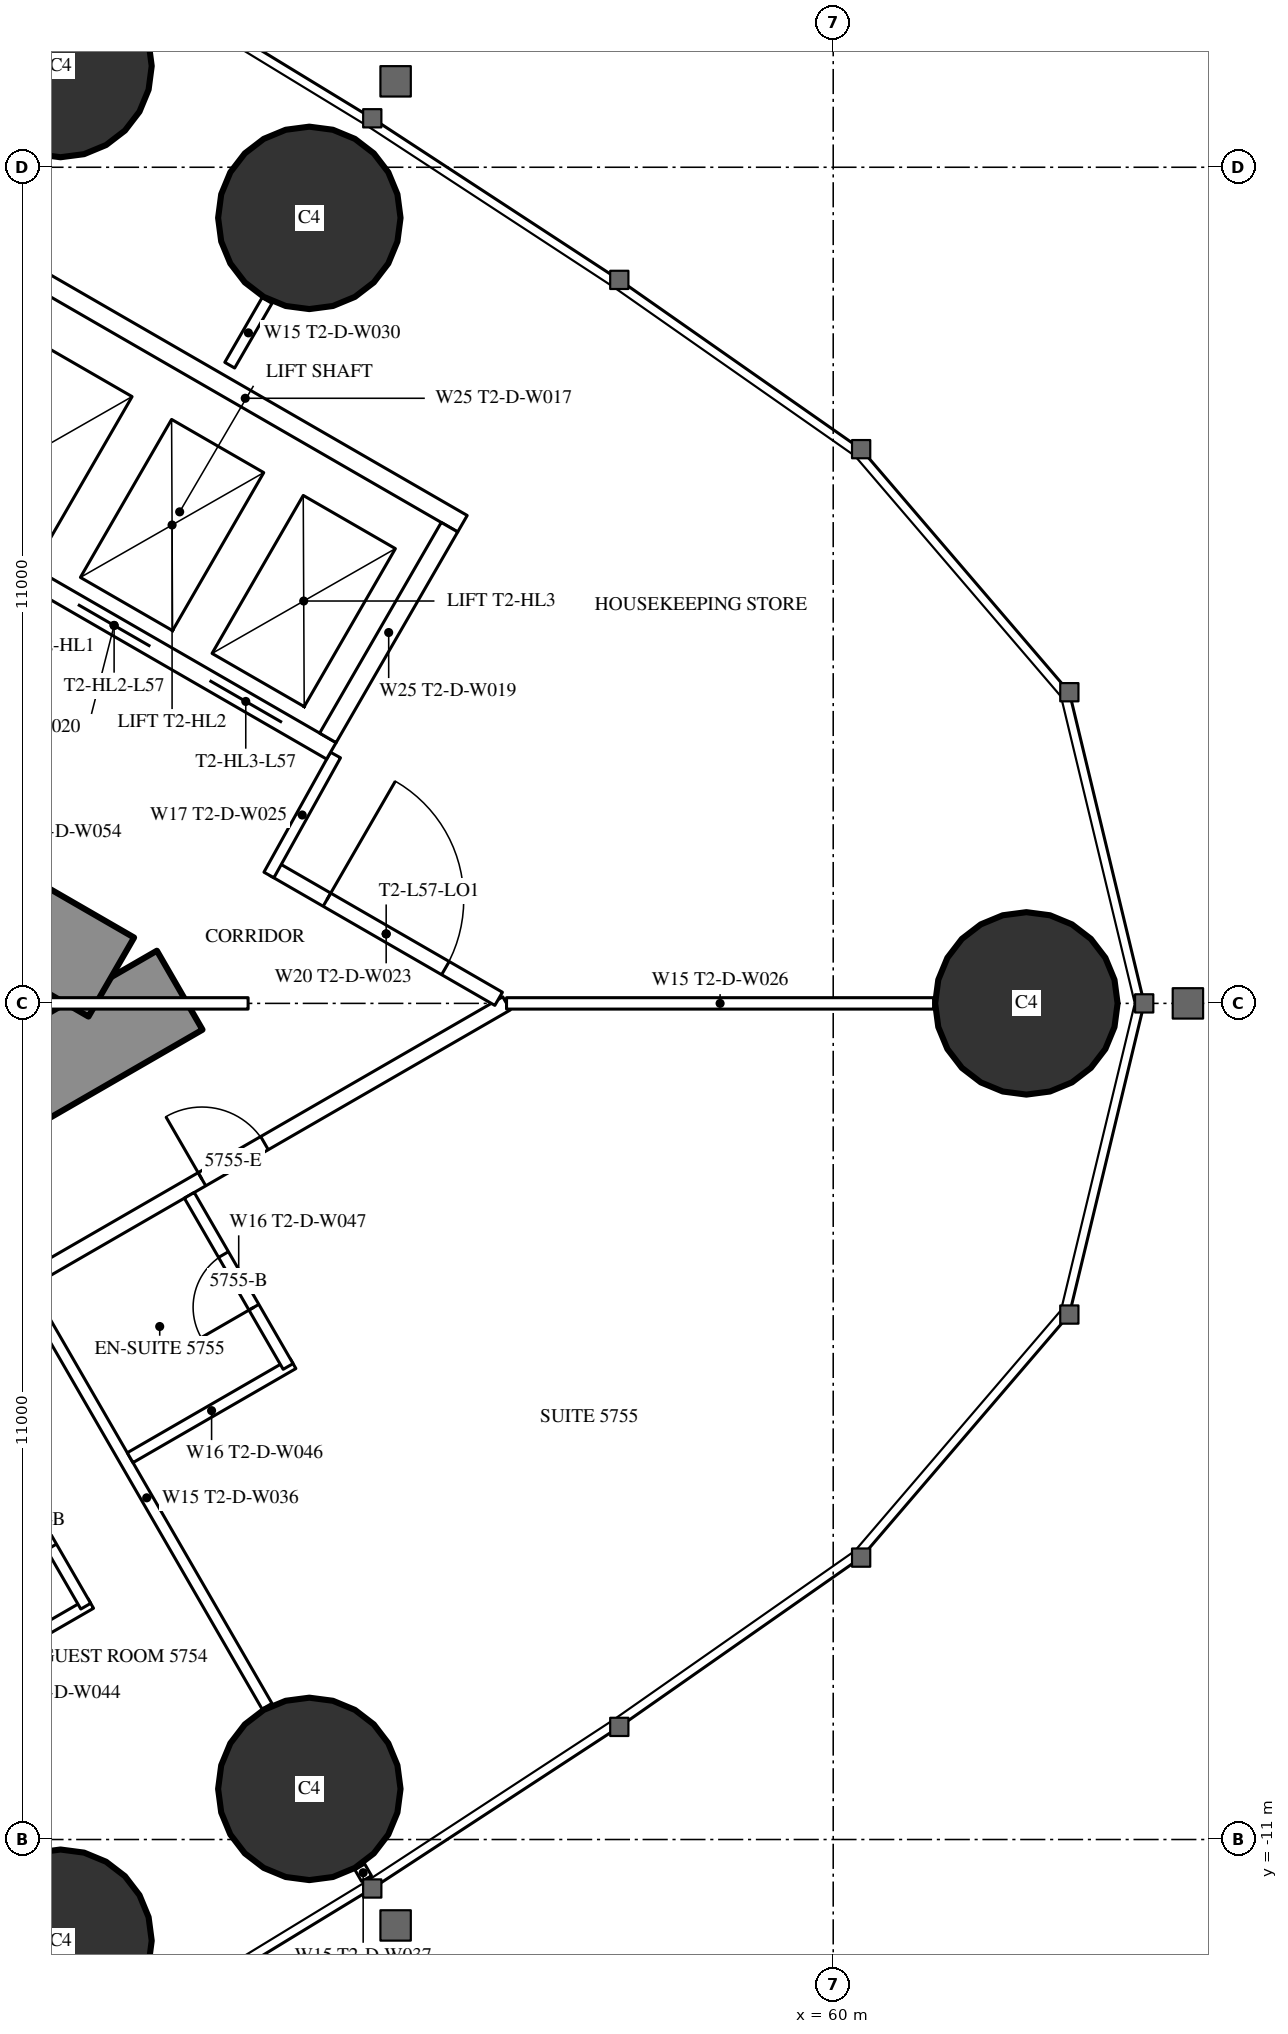
"""IFC4 building model, lengths in metres.
Left out: names, types, materials, properties, quantities, classifications, styles, units other than length and angle.
Written with IfcOpenShell. Run it as: python <this file> out.ifc"""

import sys

from ifc_helpers import new_model, si_unit, direction, frame, frame_2d, origin, origin_2d, place, context, subcontext, project, spatial, rectangle, circle, extrude, element, fill, save


model = new_model("IFC4")
c1 = context("Model", 3, precision=1e-05, world=origin(), true_north=direction((0.0, 1.0)))
c2 = subcontext(c1, "Body", "Model", "MODEL_VIEW")
j1 = project(units=[si_unit("LENGTHUNIT", "METRE"), si_unit("PLANEANGLEUNIT", "RADIAN")], contexts=[c1])
p1 = place(None, origin())
s1 = spatial("IfcSite", under=j1, at=p1, CompositionType="ELEMENT")
p2 = place(p1, origin())
s2 = spatial("IfcBuilding", under=s1, at=p2, CompositionType="ELEMENT")
p3 = place(p2, frame((0.0, 0.0, 215.3)))
s3 = spatial("IfcBuildingStorey", under=s2, at=p3, CompositionType="ELEMENT", Elevation=215.3)
for number, where, z_axis, x_axis in (
    (1, (62.542, 0.0, 0.0), (0.0, 0.0, 1.0), (1.0, 0.0, 0.0)),
    (2, (53.108, 10.334, 0.0), (0.0, 0.0, 1.0), (1.0, 0.0, 0.0)),
    (3, (49.834, 12.332, 0.0), (0.0, 0.0, 1.0), (1.0, 0.0, 0.0)),
    (4, (49.834, -12.332, 0.0), (0.0, 0.0, 1.0), (1.0, 0.0, 0.0)),
    (5, (53.108, -10.334, 0.0), (0.0, 0.0, 1.0), (1.0, 0.0, 0.0)),
):
    element("IfcColumn", number, at=place(p3, frame(where, z_axis=z_axis, x_axis=x_axis)), inside=s3, PredefinedType="COLUMN", context=c2, shape_type="SweptSolid", body=[
        extrude(circle(Radius=1.2, at=origin_2d()), origin(), (0.0, 0.0, 1.0), 3.6),
    ])
p4 = place(p3, frame((27.2, -13.8, 0.0), z_axis=(0.0, 0.0, 1.0), x_axis=(0.866027159892, 0.499996958321, 0.0)))
e6 = element("IfcWall", 6, at=p4, inside=s3, PredefinedType="SHEAR", context=c2, shape_type="SweptSolid", body=[
    extrude(rectangle(XDim=27.947, YDim=1.2, at=frame_2d((13.973, 0.0))), origin(), (0.0, 0.0, 1.0), 3.6),
])
p5 = place(p4, frame((4.6, 0.0, 0.0)))
e7 = element("IfcOpeningElement", 7, at=p5, cuts=e6, PredefinedType="OPENING", context=c2, shape_type="SweptSolid", body=[
    extrude(rectangle(XDim=1.0, YDim=2.2, at=frame_2d((0.5, 1.1))), frame((0.0, 0.61, 0.0), z_axis=(0.0, -1.0, 0.0), x_axis=(1.0, 0.0, 0.0)), (0.0, 0.0, 1.0), 1.22),
])
p6 = place(p4, frame((13.395, 0.0, 0.0)))
e8 = element("IfcOpeningElement", 8, at=p6, cuts=e6, PredefinedType="OPENING", context=c2, shape_type="SweptSolid", body=[
    extrude(rectangle(XDim=1.8, YDim=2.2, at=frame_2d((0.9, 1.1))), frame((0.0, 0.61, 0.0), z_axis=(0.0, -1.0, 0.0), x_axis=(1.0, 0.0, 0.0)), (0.0, 0.0, 1.0), 1.22),
])
p7 = place(p3, frame((27.2, 13.8, 0.0), z_axis=(0.0, 0.0, 1.0), x_axis=(0.866024515034, -0.500001539357, 0.0)))
e9 = element("IfcWall", 9, at=p7, inside=s3, PredefinedType="SHEAR", context=c2, shape_type="SweptSolid", body=[
    extrude(rectangle(XDim=26.907, YDim=1.2, at=frame_2d((13.454, 0.0))), origin(), (0.0, 0.0, 1.0), 3.6),
])
p8 = place(p7, frame((4.6, 0.0, 0.0)))
e10 = element("IfcOpeningElement", 10, at=p8, cuts=e9, PredefinedType="OPENING", context=c2, shape_type="SweptSolid", body=[
    extrude(rectangle(XDim=1.0, YDim=2.2, at=frame_2d((0.5, 1.1))), frame((0.0, 0.61, 0.0), z_axis=(0.0, -1.0, 0.0), x_axis=(1.0, 0.0, 0.0)), (0.0, 0.0, 1.0), 1.22),
])
p9 = place(p7, frame((13.395, 0.0, 0.0)))
e11 = element("IfcOpeningElement", 11, at=p9, cuts=e9, PredefinedType="OPENING", context=c2, shape_type="SweptSolid", body=[
    extrude(rectangle(XDim=1.8, YDim=2.2, at=frame_2d((0.9, 1.1))), frame((0.0, 0.61, 0.0), z_axis=(0.0, -1.0, 0.0), x_axis=(1.0, 0.0, 0.0)), (0.0, 0.0, 1.0), 1.22),
])
p10 = place(p3, frame((28.959, -15.44, 0.0), z_axis=(0.0, 0.0, 1.0), x_axis=(0.866025227435, 0.500000305447, 0.0)))
e12 = element("IfcWall", 12, at=p10, inside=s3, PredefinedType="PARTITIONING", context=c2, shape_type="SweptSolid", body=[
    extrude(rectangle(XDim=30.88, YDim=0.2, at=frame_2d((15.44, 0.0))), origin(), (0.0, 0.0, 1.0), 3.35),
])
p11 = place(p10, frame((0.494, 0.0, 0.0)))
e13 = element("IfcOpeningElement", 13, at=p11, cuts=e12, PredefinedType="OPENING", context=c2, shape_type="SweptSolid", body=[
    extrude(rectangle(XDim=1.8, YDim=2.2, at=frame_2d((0.9, 1.1))), frame((0.0, 0.11, 0.0), z_axis=(0.0, -1.0, 0.0), x_axis=(1.0, 0.0, 0.0)), (0.0, 0.0, 1.0), 0.22),
])
p12 = place(p10, frame((7.687, 0.0, 0.0)))
e14 = element("IfcOpeningElement", 14, at=p12, cuts=e12, PredefinedType="OPENING", context=c2, shape_type="SweptSolid", body=[
    extrude(rectangle(XDim=1.0, YDim=2.2, at=frame_2d((0.5, 1.1))), frame((0.0, 0.11, 0.0), z_axis=(0.0, -1.0, 0.0), x_axis=(1.0, 0.0, 0.0)), (0.0, 0.0, 1.0), 0.22),
])
p13 = place(p10, frame((16.137, 0.0, 0.0)))
e15 = element("IfcOpeningElement", 15, at=p13, cuts=e12, PredefinedType="OPENING", context=c2, shape_type="SweptSolid", body=[
    extrude(rectangle(XDim=0.95, YDim=2.2, at=frame_2d((0.475, 1.1))), frame((0.0, 0.11, 0.0), z_axis=(0.0, -1.0, 0.0), x_axis=(1.0, 0.0, 0.0)), (0.0, 0.0, 1.0), 0.22),
])
p14 = place(p10, frame((20.021, 0.0, 0.0)))
e16 = element("IfcOpeningElement", 16, at=p14, cuts=e12, PredefinedType="OPENING", context=c2, shape_type="SweptSolid", body=[
    extrude(rectangle(XDim=0.95, YDim=2.2, at=frame_2d((0.475, 1.1))), frame((0.0, 0.11, 0.0), z_axis=(0.0, -1.0, 0.0), x_axis=(1.0, 0.0, 0.0)), (0.0, 0.0, 1.0), 0.22),
])
p15 = place(p10, frame((26.253, 0.0, 0.0)))
e17 = element("IfcOpeningElement", 17, at=p15, cuts=e12, PredefinedType="OPENING", context=c2, shape_type="SweptSolid", body=[
    extrude(rectangle(XDim=0.95, YDim=2.2, at=frame_2d((0.475, 1.1))), frame((0.0, 0.11, 0.0), z_axis=(0.0, -1.0, 0.0), x_axis=(1.0, 0.0, 0.0)), (0.0, 0.0, 1.0), 0.22),
])
p16 = place(p3, frame((49.385, -3.763, 0.0), z_axis=(0.0, 0.0, 1.0), x_axis=(0.499999447814, -0.866025722589, 0.0)))
e18 = element("IfcWall", 18, at=p16, inside=s3, PredefinedType="PARTITIONING", context=c2, shape_type="SweptSolid", body=[
    extrude(rectangle(XDim=6.333, YDim=0.15, at=frame_2d((3.166, 0.0))), origin(), (0.0, 0.0, 1.0), 2.45),
])
p17 = place(p3, frame((53.771, -11.36, 0.0), z_axis=(0.0, 0.0, 1.0), x_axis=(0.499524978789, -0.866299483762, 0.0)))
e19 = element("IfcWall", 19, at=p17, inside=s3, PredefinedType="PARTITIONING", context=c2, shape_type="SweptSolid", body=[
    extrude(rectangle(XDim=0.178, YDim=0.15, at=frame_2d((0.089, 0.0))), origin(), (0.0, 0.0, 1.0), 2.45),
])
p18 = place(p3, frame((55.702, 0.0, 0.0), z_axis=(0.0, 0.0, 1.0), x_axis=(1.0, 0.0, 0.0)))
e20 = element("IfcWall", 20, at=p18, inside=s3, PredefinedType="PARTITIONING", context=c2, shape_type="SweptSolid", body=[
    extrude(rectangle(XDim=5.619, YDim=0.15, at=frame_2d((2.81, 0.0))), origin(), (0.0, 0.0, 1.0), 2.45),
])
p19 = place(p3, frame((52.06, 8.396, 0.0), z_axis=(0.0, 0.0, 1.0), x_axis=(0.500095379624, 0.865970329329, 0.0)))
e21 = element("IfcWall", 21, at=p19, inside=s3, PredefinedType="PARTITIONING", context=c2, shape_type="SweptSolid", body=[
    extrude(rectangle(XDim=0.982, YDim=0.15, at=frame_2d((0.491, 0.0))), origin(), (0.0, 0.0, 1.0), 3.35),
])
p20 = place(p3, frame((52.639, 1.769, 0.0), z_axis=(0.0, 0.0, 1.0), x_axis=(0.866027340901, -0.4999966448, 0.0)))
e22 = element("IfcWall", 22, at=p20, inside=s3, PredefinedType="PARTITIONING", context=c2, shape_type="SweptSolid", body=[
    extrude(rectangle(XDim=3.417, YDim=0.2, at=frame_2d((1.708, 0.0))), origin(), (0.0, 0.0, 1.0), 3.35),
])
p21 = place(p20, frame((0.809, 0.0, 0.0)))
e23 = element("IfcOpeningElement", 23, at=p21, cuts=e22, PredefinedType="OPENING", context=c2, shape_type="SweptSolid", body=[
    extrude(rectangle(XDim=1.8, YDim=2.2, at=frame_2d((0.9, 1.1))), frame((0.0, 0.11, 0.0), z_axis=(0.0, -1.0, 0.0), x_axis=(1.0, 0.0, 0.0)), (0.0, 0.0, 1.0), 0.22),
])
p22 = place(p3, frame((52.576, 1.689, 0.0), z_axis=(0.0, 0.0, 1.0), x_axis=(0.485424724123, 0.874278466629, 0.0)))
e24 = element("IfcWall", 24, at=p22, inside=s3, PredefinedType="PARTITIONING", context=c2, shape_type="SweptSolid", body=[
    extrude(rectangle(XDim=1.805, YDim=0.15, at=frame_2d((0.903, 0.0))), origin(), (0.0, 0.0, 1.0), 3.35),
])
p23 = place(p3, frame((48.088, -9.13, 0.0), z_axis=(0.0, 0.0, 1.0), x_axis=(0.86604923931, 0.499958713387, 0.0)))
e25 = element("IfcWall", 25, at=p23, inside=s3, PredefinedType="PARTITIONING", context=c2, shape_type="SweptSolid", body=[
    extrude(rectangle(XDim=2.475, YDim=0.15, at=frame_2d((1.237, 0.0))), origin(), (0.0, 0.0, 1.0), 3.35),
])
p24 = place(p3, frame((48.866, -5.679, 0.0), z_axis=(0.0, 0.0, 1.0), x_axis=(0.500006934395, -0.866021400173, 0.0)))
e26 = element("IfcWall", 26, at=p24, inside=s3, PredefinedType="PARTITIONING", context=c2, shape_type="SweptSolid", body=[
    extrude(rectangle(XDim=2.6, YDim=0.15, at=frame_2d((1.3, 0.0))), origin(), (0.0, 0.0, 1.0), 3.35),
])
p25 = place(p24, frame((0.9, 0.0, 0.0)))
e27 = element("IfcOpeningElement", 27, at=p25, cuts=e26, PredefinedType="OPENING", context=c2, shape_type="SweptSolid", body=[
    extrude(rectangle(XDim=0.8, YDim=2.2, at=frame_2d((0.4, 1.1))), frame((0.0, 0.085, 0.0), z_axis=(0.0, -1.0, 0.0), x_axis=(1.0, 0.0, 0.0)), (0.0, 0.0, 1.0), 0.17),
])
p26 = place(p3, frame((50.75, -5.977, 0.0), z_axis=(0.0, 0.0, 1.0), x_axis=(0.866031185235, 0.4999899861, 0.0)))
e28 = element("IfcWall", 28, at=p26, inside=s3, PredefinedType="PARTITIONING", context=c2, shape_type="SweptSolid", body=[
    extrude(rectangle(XDim=2.475, YDim=0.15, at=frame_2d((1.238, 0.0))), origin(), (0.0, 0.0, 1.0), 3.35),
])
p27 = place(p3, frame((51.529, -2.525, 0.0), z_axis=(0.0, 0.0, 1.0), x_axis=(0.500006934395, -0.866021400173, 0.0)))
e29 = element("IfcWall", 29, at=p27, inside=s3, PredefinedType="PARTITIONING", context=c2, shape_type="SweptSolid", body=[
    extrude(rectangle(XDim=2.6, YDim=0.15, at=frame_2d((1.3, 0.0))), origin(), (0.0, 0.0, 1.0), 3.35),
])
p28 = place(p27, frame((0.9, 0.0, 0.0)))
e30 = element("IfcOpeningElement", 30, at=p28, cuts=e29, PredefinedType="OPENING", context=c2, shape_type="SweptSolid", body=[
    extrude(rectangle(XDim=0.8, YDim=2.2, at=frame_2d((0.4, 1.1))), frame((0.0, 0.085, 0.0), z_axis=(0.0, -1.0, 0.0), x_axis=(1.0, 0.0, 0.0)), (0.0, 0.0, 1.0), 0.17),
])
p29 = place(p3, frame((44.575, 0.0, 0.0), z_axis=(0.0, 0.0, 1.0), x_axis=(1.0, 0.0, 0.0)))
e31 = element("IfcWall", 31, at=p29, inside=s3, PredefinedType="PARTITIONING", context=c2, shape_type="SweptSolid", body=[
    extrude(rectangle(XDim=7.727, YDim=0.15, at=frame_2d((3.864, 0.0))), origin(), (0.0, 0.0, 1.0), 2.45),
])
p30 = place(p3, frame((47.681, 6.622, 0.0), z_axis=(0.0, 0.0, 1.0), x_axis=(0.86603344179, -0.499986077507, 0.0)))
e32 = element("IfcWall", 32, at=p30, inside=s3, PredefinedType="PARTITIONING", context=c2, shape_type="SweptSolid", body=[
    extrude(rectangle(XDim=6.6, YDim=0.25, at=frame_2d((3.3, 0.0))), origin(), (0.0, 0.0, 1.0), 3.35),
])
p31 = place(p30, frame((0.75, 0.0, 0.0)))
e33 = element("IfcOpeningElement", 33, at=p31, cuts=e32, PredefinedType="OPENING", context=c2, shape_type="SweptSolid", body=[
    extrude(rectangle(XDim=1.1, YDim=2.2, at=frame_2d((0.55, 1.1))), frame((0.0, 0.135, 0.0), z_axis=(0.0, -1.0, 0.0), x_axis=(1.0, 0.0, 0.0)), (0.0, 0.0, 1.0), 0.27),
])
p32 = place(p30, frame((2.75, 0.0, 0.0)))
e34 = element("IfcOpeningElement", 34, at=p32, cuts=e32, PredefinedType="OPENING", context=c2, shape_type="SweptSolid", body=[
    extrude(rectangle(XDim=1.1, YDim=2.2, at=frame_2d((0.55, 1.1))), frame((0.0, 0.135, 0.0), z_axis=(0.0, -1.0, 0.0), x_axis=(1.0, 0.0, 0.0)), (0.0, 0.0, 1.0), 0.27),
])
p33 = place(p30, frame((4.75, 0.0, 0.0)))
e35 = element("IfcOpeningElement", 35, at=p33, cuts=e32, PredefinedType="OPENING", context=c2, shape_type="SweptSolid", body=[
    extrude(rectangle(XDim=1.1, YDim=2.2, at=frame_2d((0.55, 1.1))), frame((0.0, 0.135, 0.0), z_axis=(0.0, -1.0, 0.0), x_axis=(1.0, 0.0, 0.0)), (0.0, 0.0, 1.0), 0.27),
])
p34 = place(p3, frame((49.406, 9.611, 0.0), z_axis=(0.0, 0.0, 1.0), x_axis=(0.86603344179, -0.499986077507, 0.0)))
e36 = element("IfcWall", 36, at=p34, inside=s3, PredefinedType="PARTITIONING", context=c2, shape_type="SweptSolid", body=[
    extrude(rectangle(XDim=6.6, YDim=0.25, at=frame_2d((3.3, 0.0))), origin(), (0.0, 0.0, 1.0), 3.35),
])
p35 = place(p3, frame((53.352, 3.493, 0.0), z_axis=(0.0, 0.0, 1.0), x_axis=(0.499872130319, 0.866099216793, 0.0)))
e37 = element("IfcWall", 37, at=p35, inside=s3, PredefinedType="PARTITIONING", context=c2, shape_type="SweptSolid", body=[
    extrude(rectangle(XDim=3.2, YDim=0.25, at=frame_2d((1.6, 0.0))), origin(), (0.0, 0.0, 1.0), 3.35),
])
p36 = place(p25, origin())
e38 = element("IfcDoor", 38, at=p36, inside=s3, OperationType="SINGLE_SWING_RIGHT", PredefinedType="DOOR", context=c2, shape_type="SweptSolid", body=[
    extrude(rectangle(XDim=0.8, YDim=2.2, at=frame_2d((0.4, 1.1))), frame((0.0, 0.025, 0.0), z_axis=(0.0, -1.0, 0.0), x_axis=(1.0, 0.0, 0.0)), (0.0, 0.0, 1.0), 0.05),
])
fill(e27, e38)
p37 = place(p28, origin())
e39 = element("IfcDoor", 39, at=p37, inside=s3, OperationType="SINGLE_SWING_RIGHT", PredefinedType="DOOR", context=c2, shape_type="SweptSolid", body=[
    extrude(rectangle(XDim=0.8, YDim=2.2, at=frame_2d((0.4, 1.1))), frame((0.0, 0.025, 0.0), z_axis=(0.0, -1.0, 0.0), x_axis=(1.0, 0.0, 0.0)), (0.0, 0.0, 1.0), 0.05),
])
fill(e30, e39)
p38 = place(p15, origin())
e40 = element("IfcDoor", 40, at=p38, inside=s3, OperationType="SINGLE_SWING_LEFT", PredefinedType="DOOR", context=c2, shape_type="SweptSolid", body=[
    extrude(rectangle(XDim=0.95, YDim=2.2, at=frame_2d((0.475, 1.1))), frame((0.0, 0.025, 0.0), z_axis=(0.0, -1.0, 0.0), x_axis=(1.0, 0.0, 0.0)), (0.0, 0.0, 1.0), 0.05),
])
fill(e17, e40)
p39 = place(p21, origin())
e41 = element("IfcDoor", 41, at=p39, inside=s3, OperationType="DOUBLE_DOOR_SINGLE_SWING", PredefinedType="DOOR", context=c2, shape_type="SweptSolid", body=[
    extrude(rectangle(XDim=1.8, YDim=2.2, at=frame_2d((0.9, 1.1))), frame((0.0, 0.025, 0.0), z_axis=(0.0, -1.0, 0.0), x_axis=(1.0, 0.0, 0.0)), (0.0, 0.0, 1.0), 0.05),
])
fill(e23, e41)
p40 = place(p32, origin())
e42 = element("IfcDoor", 42, at=p40, inside=s3, OperationType="DOUBLE_DOOR_SLIDING", PredefinedType="USERDEFINED", context=c2, shape_type="SweptSolid", body=[
    extrude(rectangle(XDim=1.1, YDim=2.2, at=frame_2d((0.55, 1.1))), frame((0.0, 0.025, 0.0), z_axis=(0.0, -1.0, 0.0), x_axis=(1.0, 0.0, 0.0)), (0.0, 0.0, 1.0), 0.05),
])
fill(e34, e42)
p41 = place(p33, origin())
e43 = element("IfcDoor", 43, at=p41, inside=s3, OperationType="DOUBLE_DOOR_SLIDING", PredefinedType="USERDEFINED", context=c2, shape_type="SweptSolid", body=[
    extrude(rectangle(XDim=1.1, YDim=2.2, at=frame_2d((0.55, 1.1))), frame((0.0, 0.025, 0.0), z_axis=(0.0, -1.0, 0.0), x_axis=(1.0, 0.0, 0.0)), (0.0, 0.0, 1.0), 0.05),
])
fill(e35, e43)
save(model, sys.argv[1])
